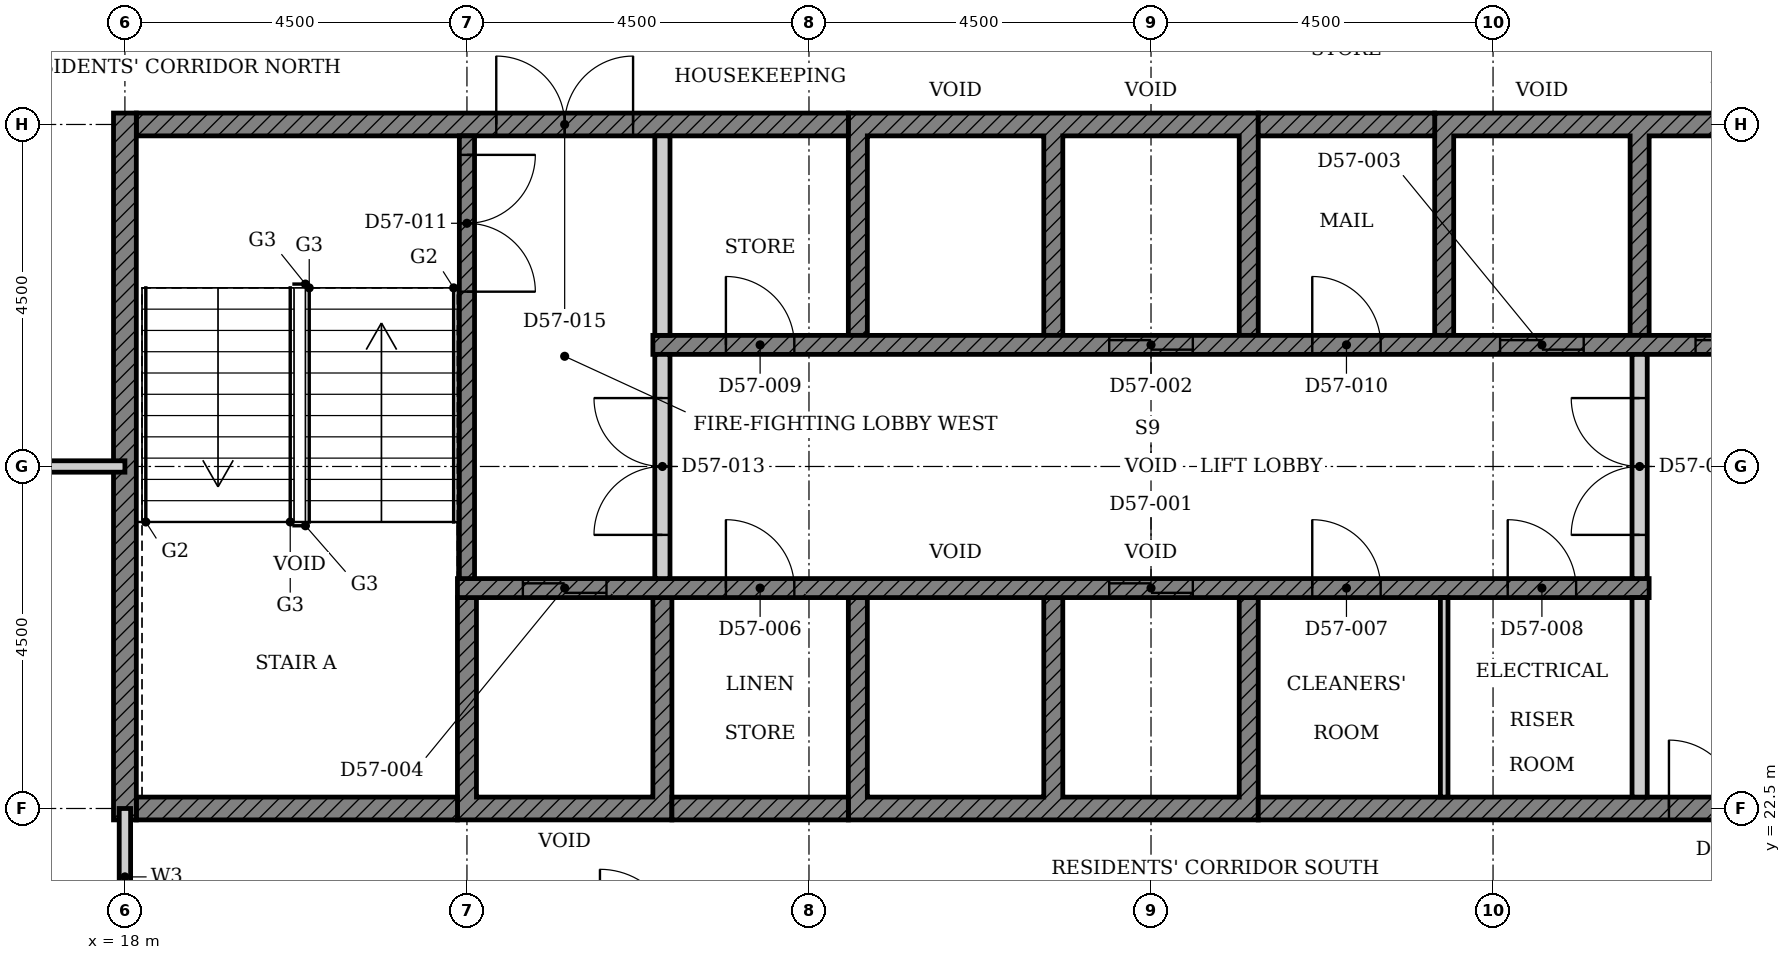
"""IFC4 building model, lengths in metres.
Left out: names, types, materials, properties, quantities, classifications, styles, units other than length and angle.
Written with IfcOpenShell. Run it as: python <this file> out.ifc"""

import sys

from ifc_helpers import new_model, si_unit, direction, frame, frame_2d, origin, place, context, subcontext, project, spatial, polyline, rectangle, outline, extrude, element, fill, save


model = new_model("IFC4")
c1 = context("Model", 3, precision=1e-05, world=origin(), true_north=direction((0.0, 1.0)))
c2 = subcontext(c1, "Body", "Model", "MODEL_VIEW")
j1 = project(units=[si_unit("LENGTHUNIT", "METRE"), si_unit("PLANEANGLEUNIT", "RADIAN")], contexts=[c1])
p1 = place(None, origin())
s1 = spatial("IfcSite", under=j1, at=p1, CompositionType="ELEMENT")
p2 = place(p1, origin())
s2 = spatial("IfcBuilding", under=s1, at=p2, CompositionType="ELEMENT")
p3 = place(p2, frame((0.0, 0.0, 225.7)))
s3 = spatial("IfcBuildingStorey", under=s2, at=p3, CompositionType="ELEMENT", Elevation=225.7)
p4 = place(p3, origin())
e1 = element("IfcWall", 1, at=p4, inside=s3, PredefinedType="SHEAR", context=c2, shape_type="SweptSolid", body=[
    extrude(outline(polyline([(22.375, 22.35), (25.197, 22.35), (25.197, 25.275), (24.947, 25.275), (24.947, 22.65), (22.625, 22.65), (22.625, 25.275), (22.375, 25.275), (22.375, 22.35)])), origin(), (0.0, 0.0, 1.0), 3.4),
])
p5 = place(p3, origin())
e2 = element("IfcWall", 2, at=p5, inside=s3, PredefinedType="SHEAR", context=c2, shape_type="SweptSolid", body=[
    extrude(outline(polyline([(27.518, 22.35), (32.911, 22.35), (32.911, 25.275), (32.661, 25.275), (32.661, 22.65), (30.339, 22.65), (30.339, 25.275), (30.089, 25.275), (30.089, 22.65), (27.768, 22.65), (27.768, 25.275), (27.518, 25.275), (27.518, 22.35)])), origin(), (0.0, 0.0, 1.0), 3.4),
])
p6 = place(p3, origin())
e3 = element("IfcWall", 3, at=p6, inside=s3, PredefinedType="SHEAR", context=c2, shape_type="SweptSolid", body=[
    extrude(outline(polyline([(27.518, 28.725), (27.768, 28.725), (27.768, 31.35), (30.089, 31.35), (30.089, 28.725), (30.339, 28.725), (30.339, 31.35), (32.661, 31.35), (32.661, 28.725), (32.911, 28.725), (32.911, 31.65), (27.518, 31.65), (27.518, 28.725)])), origin(), (0.0, 0.0, 1.0), 3.4),
])
p7 = place(p3, origin())
e4 = element("IfcWall", 4, at=p7, inside=s3, PredefinedType="SHEAR", context=c2, shape_type="SweptSolid", body=[
    extrude(outline(polyline([(35.232, 28.725), (35.482, 28.725), (35.482, 31.35), (37.803, 31.35), (37.803, 28.725), (38.053, 28.725), (38.053, 31.35), (40.375, 31.35), (40.375, 28.725), (40.625, 28.725), (40.625, 31.65), (35.232, 31.65), (35.232, 28.725)])), origin(), (0.0, 0.0, 1.0), 3.4),
])
p8 = place(p3, frame((18.15, 22.5, 0.0), z_axis=(0.0, 0.0, 1.0), x_axis=(1.0, 0.0, 0.0)))
e5 = element("IfcWall", 5, at=p8, inside=s3, PredefinedType="SHEAR", context=c2, shape_type="SweptSolid", body=[
    extrude(rectangle(XDim=4.225, YDim=0.3, at=frame_2d((2.113, 0.0))), origin(), (0.0, 0.0, 1.0), 3.4),
])
p9 = place(p3, frame((25.197, 22.5, 0.0), z_axis=(0.0, 0.0, 1.0), x_axis=(1.0, 0.0, 0.0)))
e6 = element("IfcWall", 6, at=p9, inside=s3, PredefinedType="SHEAR", context=c2, shape_type="SweptSolid", body=[
    extrude(rectangle(XDim=2.321, YDim=0.3, at=frame_2d((1.161, 0.0))), origin(), (0.0, 0.0, 1.0), 3.4),
])
p10 = place(p3, frame((32.911, 22.5, 0.0), z_axis=(0.0, 0.0, 1.0), x_axis=(1.0, 0.0, 0.0)))
e7 = element("IfcWall", 7, at=p10, inside=s3, PredefinedType="SHEAR", context=c2, shape_type="SweptSolid", body=[
    extrude(rectangle(XDim=11.939, YDim=0.3, at=frame_2d((5.97, 0.0))), origin(), (0.0, 0.0, 1.0), 3.4),
])
p11 = place(p10, frame((5.404, 0.0, 0.0)))
e8 = element("IfcOpeningElement", 8, at=p11, cuts=e7, PredefinedType="OPENING", context=c2, shape_type="SweptSolid", body=[
    extrude(rectangle(XDim=1.8, YDim=2.1, at=frame_2d((0.9, 1.05))), frame((0.0, 0.16, 0.0), z_axis=(0.0, -1.0, 0.0), x_axis=(1.0, 0.0, 0.0)), (0.0, 0.0, 1.0), 0.32),
])
p12 = place(p3, frame((18.15, 31.5, 0.0), z_axis=(0.0, 0.0, 1.0), x_axis=(1.0, 0.0, 0.0)))
e9 = element("IfcWall", 9, at=p12, inside=s3, PredefinedType="SHEAR", context=c2, shape_type="SweptSolid", body=[
    extrude(rectangle(XDim=9.368, YDim=0.3, at=frame_2d((4.684, 0.0))), origin(), (0.0, 0.0, 1.0), 3.4),
])
p13 = place(p12, frame((4.736, 0.0, 0.0)))
e10 = element("IfcOpeningElement", 10, at=p13, cuts=e9, PredefinedType="OPENING", context=c2, shape_type="SweptSolid", body=[
    extrude(rectangle(XDim=1.8, YDim=2.1, at=frame_2d((0.9, 1.05))), frame((0.0, 0.16, 0.0), z_axis=(0.0, -1.0, 0.0), x_axis=(1.0, 0.0, 0.0)), (0.0, 0.0, 1.0), 0.32),
])
p14 = place(p3, frame((32.911, 31.5, 0.0), z_axis=(0.0, 0.0, 1.0), x_axis=(1.0, 0.0, 0.0)))
e11 = element("IfcWall", 11, at=p14, inside=s3, PredefinedType="SHEAR", context=c2, shape_type="SweptSolid", body=[
    extrude(rectangle(XDim=2.322, YDim=0.3, at=frame_2d((1.161, 0.0))), origin(), (0.0, 0.0, 1.0), 3.4),
])
p15 = place(p3, frame((18.0, 22.35, 0.0), z_axis=(0.0, 0.0, 1.0), x_axis=(0.0, 1.0, 0.0)))
e12 = element("IfcWall", 12, at=p15, inside=s3, PredefinedType="SHEAR", context=c2, shape_type="SweptSolid", body=[
    extrude(rectangle(XDim=9.3, YDim=0.3, at=frame_2d((4.65, 0.0))), origin(), (0.0, 0.0, 1.0), 3.4),
])
p16 = place(p3, frame((22.375, 25.4, 0.0), z_axis=(0.0, 0.0, 1.0), x_axis=(1.0, 0.0, 0.0)))
e13 = element("IfcWall", 13, at=p16, inside=s3, PredefinedType="SHEAR", context=c2, shape_type="SweptSolid", body=[
    extrude(rectangle(XDim=15.678, YDim=0.25, at=frame_2d((7.839, 0.0))), origin(), (0.0, 0.0, 1.0), 3.4),
])
p17 = place(p16, frame((8.575, 0.0, 0.0)))
e14 = element("IfcOpeningElement", 14, at=p17, cuts=e13, PredefinedType="OPENING", context=c2, shape_type="SweptSolid", body=[
    extrude(rectangle(XDim=1.1, YDim=2.1, at=frame_2d((0.55, 1.05))), frame((0.0, 0.135, 0.0), z_axis=(0.0, -1.0, 0.0), x_axis=(1.0, 0.0, 0.0)), (0.0, 0.0, 1.0), 0.27),
])
p18 = place(p16, frame((0.861, 0.0, 0.0)))
e15 = element("IfcOpeningElement", 15, at=p18, cuts=e13, PredefinedType="OPENING", context=c2, shape_type="SweptSolid", body=[
    extrude(rectangle(XDim=1.1, YDim=2.1, at=frame_2d((0.55, 1.05))), frame((0.0, 0.135, 0.0), z_axis=(0.0, -1.0, 0.0), x_axis=(1.0, 0.0, 0.0)), (0.0, 0.0, 1.0), 0.27),
])
p19 = place(p16, frame((3.532, 0.0, 0.0)))
e16 = element("IfcOpeningElement", 16, at=p19, cuts=e13, PredefinedType="OPENING", context=c2, shape_type="SweptSolid", body=[
    extrude(rectangle(XDim=0.9, YDim=2.1, at=frame_2d((0.45, 1.05))), frame((0.0, 0.135, 0.0), z_axis=(0.0, -1.0, 0.0), x_axis=(1.0, 0.0, 0.0)), (0.0, 0.0, 1.0), 0.27),
])
p20 = place(p16, frame((11.246, 0.0, 0.0)))
e17 = element("IfcOpeningElement", 17, at=p20, cuts=e13, PredefinedType="OPENING", context=c2, shape_type="SweptSolid", body=[
    extrude(rectangle(XDim=0.9, YDim=2.1, at=frame_2d((0.45, 1.05))), frame((0.0, 0.135, 0.0), z_axis=(0.0, -1.0, 0.0), x_axis=(1.0, 0.0, 0.0)), (0.0, 0.0, 1.0), 0.27),
])
p21 = place(p16, frame((13.818, 0.0, 0.0)))
e18 = element("IfcOpeningElement", 18, at=p21, cuts=e13, PredefinedType="OPENING", context=c2, shape_type="SweptSolid", body=[
    extrude(rectangle(XDim=0.9, YDim=2.1, at=frame_2d((0.45, 1.05))), frame((0.0, 0.135, 0.0), z_axis=(0.0, -1.0, 0.0), x_axis=(1.0, 0.0, 0.0)), (0.0, 0.0, 1.0), 0.27),
])
p22 = place(p3, frame((24.947, 28.6, 0.0), z_axis=(0.0, 0.0, 1.0), x_axis=(1.0, 0.0, 0.0)))
e19 = element("IfcWall", 19, at=p22, inside=s3, PredefinedType="SHEAR", context=c2, shape_type="SweptSolid", body=[
    extrude(rectangle(XDim=15.678, YDim=0.25, at=frame_2d((7.839, 0.0))), origin(), (0.0, 0.0, 1.0), 3.4),
])
p23 = place(p22, frame((6.004, 0.0, 0.0)))
e20 = element("IfcOpeningElement", 20, at=p23, cuts=e19, PredefinedType="OPENING", context=c2, shape_type="SweptSolid", body=[
    extrude(rectangle(XDim=1.1, YDim=2.1, at=frame_2d((0.55, 1.05))), frame((0.0, 0.135, 0.0), z_axis=(0.0, -1.0, 0.0), x_axis=(1.0, 0.0, 0.0)), (0.0, 0.0, 1.0), 0.27),
])
p24 = place(p22, frame((11.146, 0.0, 0.0)))
e21 = element("IfcOpeningElement", 21, at=p24, cuts=e19, PredefinedType="OPENING", context=c2, shape_type="SweptSolid", body=[
    extrude(rectangle(XDim=1.1, YDim=2.1, at=frame_2d((0.55, 1.05))), frame((0.0, 0.135, 0.0), z_axis=(0.0, -1.0, 0.0), x_axis=(1.0, 0.0, 0.0)), (0.0, 0.0, 1.0), 0.27),
])
p25 = place(p22, frame((13.718, 0.0, 0.0)))
e22 = element("IfcOpeningElement", 22, at=p25, cuts=e19, PredefinedType="OPENING", context=c2, shape_type="SweptSolid", body=[
    extrude(rectangle(XDim=1.1, YDim=2.1, at=frame_2d((0.55, 1.05))), frame((0.0, 0.135, 0.0), z_axis=(0.0, -1.0, 0.0), x_axis=(1.0, 0.0, 0.0)), (0.0, 0.0, 1.0), 0.27),
])
p26 = place(p22, frame((0.961, 0.0, 0.0)))
e23 = element("IfcOpeningElement", 23, at=p26, cuts=e19, PredefinedType="OPENING", context=c2, shape_type="SweptSolid", body=[
    extrude(rectangle(XDim=0.9, YDim=2.1, at=frame_2d((0.45, 1.05))), frame((0.0, 0.135, 0.0), z_axis=(0.0, -1.0, 0.0), x_axis=(1.0, 0.0, 0.0)), (0.0, 0.0, 1.0), 0.27),
])
p27 = place(p22, frame((8.675, 0.0, 0.0)))
e24 = element("IfcOpeningElement", 24, at=p27, cuts=e19, PredefinedType="OPENING", context=c2, shape_type="SweptSolid", body=[
    extrude(rectangle(XDim=0.9, YDim=2.1, at=frame_2d((0.45, 1.05))), frame((0.0, 0.135, 0.0), z_axis=(0.0, -1.0, 0.0), x_axis=(1.0, 0.0, 0.0)), (0.0, 0.0, 1.0), 0.27),
])
p28 = place(p3, frame((37.928, 22.65, 0.0), z_axis=(0.0, 0.0, 1.0), x_axis=(0.0, 1.0, 0.0)))
e25 = element("IfcWall", 25, at=p28, inside=s3, PredefinedType="PARTITIONING", context=c2, shape_type="SweptSolid", body=[
    extrude(rectangle(XDim=2.625, YDim=0.2, at=frame_2d((1.312, 0.0))), origin(), (0.0, 0.0, 1.0), 3.4),
])
p29 = place(p3, frame((35.357, 22.65, 0.0), z_axis=(0.0, 0.0, 1.0), x_axis=(0.0, 1.0, 0.0)))
e26 = element("IfcWall", 26, at=p29, inside=s3, PredefinedType="PARTITIONING", context=c2, shape_type="SweptSolid", body=[
    extrude(rectangle(XDim=2.625, YDim=0.1, at=frame_2d((1.312, 0.0))), origin(), (0.0, 0.0, 1.0), 3.4),
])
p30 = place(p3, frame((25.072, 28.725, 0.0), z_axis=(0.0, 0.0, 1.0), x_axis=(0.0, 1.0, 0.0)))
e27 = element("IfcWall", 27, at=p30, inside=s3, PredefinedType="PARTITIONING", context=c2, shape_type="SweptSolid", body=[
    extrude(rectangle(XDim=2.625, YDim=0.2, at=frame_2d((1.312, 0.0))), origin(), (0.0, 0.0, 1.0), 3.4),
])
p31 = place(p3, frame((22.5, 31.35, 0.0), z_axis=(0.0, 0.0, 1.0), x_axis=(0.0, -1.0, 0.0)))
e28 = element("IfcWall", 28, at=p31, inside=s3, PredefinedType="SHEAR", context=c2, shape_type="SweptSolid", body=[
    extrude(rectangle(XDim=5.825, YDim=0.2, at=frame_2d((2.913, 0.0))), origin(), (0.0, 0.0, 1.0), 3.4),
])
p32 = place(p31, frame((0.25, 0.0, 0.0)))
e29 = element("IfcOpeningElement", 29, at=p32, cuts=e28, PredefinedType="OPENING", context=c2, shape_type="SweptSolid", body=[
    extrude(rectangle(XDim=1.8, YDim=2.1, at=frame_2d((0.9, 1.05))), frame((0.0, 0.11, 0.0), z_axis=(0.0, -1.0, 0.0), x_axis=(1.0, 0.0, 0.0)), (0.0, 0.0, 1.0), 0.22),
])
p33 = place(p3, frame((25.072, 25.525, 0.0), z_axis=(0.0, 0.0, 1.0), x_axis=(0.0, 1.0, 0.0)))
e30 = element("IfcWall", 30, at=p33, inside=s3, PredefinedType="PARTITIONING", context=c2, shape_type="SweptSolid", body=[
    extrude(rectangle(XDim=2.95, YDim=0.2, at=frame_2d((1.475, 0.0))), origin(), (0.0, 0.0, 1.0), 3.4),
])
p34 = place(p33, frame((0.575, 0.0, 0.0)))
e31 = element("IfcOpeningElement", 31, at=p34, cuts=e30, PredefinedType="OPENING", context=c2, shape_type="SweptSolid", body=[
    extrude(rectangle(XDim=1.8, YDim=2.1, at=frame_2d((0.9, 1.05))), frame((0.0, 0.11, 0.0), z_axis=(0.0, -1.0, 0.0), x_axis=(1.0, 0.0, 0.0)), (0.0, 0.0, 1.0), 0.22),
])
p35 = place(p3, frame((37.928, 25.525, 0.0), z_axis=(0.0, 0.0, 1.0), x_axis=(0.0, 1.0, 0.0)))
e32 = element("IfcWall", 32, at=p35, inside=s3, PredefinedType="PARTITIONING", context=c2, shape_type="SweptSolid", body=[
    extrude(rectangle(XDim=2.95, YDim=0.2, at=frame_2d((1.475, 0.0))), origin(), (0.0, 0.0, 1.0), 3.4),
])
p36 = place(p35, frame((0.575, 0.0, 0.0)))
e33 = element("IfcOpeningElement", 33, at=p36, cuts=e32, PredefinedType="OPENING", context=c2, shape_type="SweptSolid", body=[
    extrude(rectangle(XDim=1.8, YDim=2.1, at=frame_2d((0.9, 1.05))), frame((0.0, 0.11, 0.0), z_axis=(0.0, -1.0, 0.0), x_axis=(1.0, 0.0, 0.0)), (0.0, 0.0, 1.0), 0.22),
])
p37 = place(p3, frame((4.5, 27.0, 0.0), z_axis=(0.0, 0.0, 1.0), x_axis=(1.0, 0.0, 0.0)))
e34 = element("IfcWall", 34, at=p37, inside=s3, PredefinedType="PARTITIONING", context=c2, shape_type="SweptSolid", body=[
    extrude(rectangle(XDim=13.5, YDim=0.15, at=frame_2d((6.75, 0.0))), origin(), (0.0, 0.0, 1.0), 2.68),
])
p38 = place(p37, frame((5.35, 0.0, 0.0)))
e35 = element("IfcOpeningElement", 35, at=p38, cuts=e34, PredefinedType="OPENING", context=c2, shape_type="SweptSolid", body=[
    extrude(rectangle(XDim=1.0, YDim=2.1, at=frame_2d((0.5, 1.05))), frame((0.0, 0.085, 0.0), z_axis=(0.0, -1.0, 0.0), x_axis=(1.0, 0.0, 0.0)), (0.0, 0.0, 1.0), 0.17),
])
p39 = place(p3, frame((18.0, 20.7, 0.0), z_axis=(0.0, 0.0, 1.0), x_axis=(0.0, 1.0, 0.0)))
e36 = element("IfcWall", 36, at=p39, inside=s3, PredefinedType="PARTITIONING", context=c2, shape_type="SweptSolid", body=[
    extrude(rectangle(XDim=1.8, YDim=0.15, at=frame_2d((0.9, 0.0))), origin(), (0.0, 0.0, 1.0), 3.4),
])
p40 = place(p17, origin())
e37 = element("IfcDoor", 37, at=p40, inside=s3, OperationType="DOUBLE_DOOR_SLIDING", PredefinedType="DOOR", context=c2, shape_type="SweptSolid", body=[
    extrude(rectangle(XDim=1.1, YDim=2.1, at=frame_2d((0.55, 1.05))), frame((0.0, 0.025, 0.0), z_axis=(0.0, -1.0, 0.0), x_axis=(1.0, 0.0, 0.0)), (0.0, 0.0, 1.0), 0.05),
])
fill(e14, e37)
p41 = place(p23, origin())
e38 = element("IfcDoor", 38, at=p41, inside=s3, OperationType="DOUBLE_DOOR_SLIDING", PredefinedType="DOOR", context=c2, shape_type="SweptSolid", body=[
    extrude(rectangle(XDim=1.1, YDim=2.1, at=frame_2d((0.55, 1.05))), frame((0.0, 0.025, 0.0), z_axis=(0.0, -1.0, 0.0), x_axis=(1.0, 0.0, 0.0)), (0.0, 0.0, 1.0), 0.05),
])
fill(e20, e38)
p42 = place(p24, origin())
e39 = element("IfcDoor", 39, at=p42, inside=s3, OperationType="DOUBLE_DOOR_SLIDING", PredefinedType="DOOR", context=c2, shape_type="SweptSolid", body=[
    extrude(rectangle(XDim=1.1, YDim=2.1, at=frame_2d((0.55, 1.05))), frame((0.0, 0.025, 0.0), z_axis=(0.0, -1.0, 0.0), x_axis=(1.0, 0.0, 0.0)), (0.0, 0.0, 1.0), 0.05),
])
fill(e21, e39)
p43 = place(p18, origin())
e40 = element("IfcDoor", 40, at=p43, inside=s3, OperationType="DOUBLE_DOOR_SLIDING", PredefinedType="DOOR", context=c2, shape_type="SweptSolid", body=[
    extrude(rectangle(XDim=1.1, YDim=2.1, at=frame_2d((0.55, 1.05))), frame((0.0, 0.025, 0.0), z_axis=(0.0, -1.0, 0.0), x_axis=(1.0, 0.0, 0.0)), (0.0, 0.0, 1.0), 0.05),
])
fill(e15, e40)
p44 = place(p25, origin())
e41 = element("IfcDoor", 41, at=p44, inside=s3, OperationType="DOUBLE_DOOR_SLIDING", PredefinedType="DOOR", context=c2, shape_type="SweptSolid", body=[
    extrude(rectangle(XDim=1.1, YDim=2.1, at=frame_2d((0.55, 1.05))), frame((0.0, 0.025, 0.0), z_axis=(0.0, -1.0, 0.0), x_axis=(1.0, 0.0, 0.0)), (0.0, 0.0, 1.0), 0.05),
])
fill(e22, e41)
p45 = place(p19, origin())
e42 = element("IfcDoor", 42, at=p45, inside=s3, OperationType="SINGLE_SWING_LEFT", PredefinedType="DOOR", context=c2, shape_type="SweptSolid", body=[
    extrude(rectangle(XDim=0.9, YDim=2.1, at=frame_2d((0.45, 1.05))), frame((0.0, 0.025, 0.0), z_axis=(0.0, -1.0, 0.0), x_axis=(1.0, 0.0, 0.0)), (0.0, 0.0, 1.0), 0.05),
])
fill(e16, e42)
p46 = place(p20, origin())
e43 = element("IfcDoor", 43, at=p46, inside=s3, OperationType="SINGLE_SWING_LEFT", PredefinedType="DOOR", context=c2, shape_type="SweptSolid", body=[
    extrude(rectangle(XDim=0.9, YDim=2.1, at=frame_2d((0.45, 1.05))), frame((0.0, 0.025, 0.0), z_axis=(0.0, -1.0, 0.0), x_axis=(1.0, 0.0, 0.0)), (0.0, 0.0, 1.0), 0.05),
])
fill(e17, e43)
p47 = place(p21, origin())
e44 = element("IfcDoor", 44, at=p47, inside=s3, OperationType="SINGLE_SWING_LEFT", PredefinedType="DOOR", context=c2, shape_type="SweptSolid", body=[
    extrude(rectangle(XDim=0.9, YDim=2.1, at=frame_2d((0.45, 1.05))), frame((0.0, 0.025, 0.0), z_axis=(0.0, -1.0, 0.0), x_axis=(1.0, 0.0, 0.0)), (0.0, 0.0, 1.0), 0.05),
])
fill(e18, e44)
p48 = place(p26, origin())
e45 = element("IfcDoor", 45, at=p48, inside=s3, OperationType="SINGLE_SWING_LEFT", PredefinedType="DOOR", context=c2, shape_type="SweptSolid", body=[
    extrude(rectangle(XDim=0.9, YDim=2.1, at=frame_2d((0.45, 1.05))), frame((0.0, 0.025, 0.0), z_axis=(0.0, -1.0, 0.0), x_axis=(1.0, 0.0, 0.0)), (0.0, 0.0, 1.0), 0.05),
])
fill(e23, e45)
p49 = place(p27, origin())
e46 = element("IfcDoor", 46, at=p49, inside=s3, OperationType="SINGLE_SWING_LEFT", PredefinedType="DOOR", context=c2, shape_type="SweptSolid", body=[
    extrude(rectangle(XDim=0.9, YDim=2.1, at=frame_2d((0.45, 1.05))), frame((0.0, 0.025, 0.0), z_axis=(0.0, -1.0, 0.0), x_axis=(1.0, 0.0, 0.0)), (0.0, 0.0, 1.0), 0.05),
])
fill(e24, e46)
p50 = place(p32, origin())
e47 = element("IfcDoor", 47, at=p50, inside=s3, OperationType="DOUBLE_DOOR_SINGLE_SWING", PredefinedType="DOOR", context=c2, shape_type="SweptSolid", body=[
    extrude(rectangle(XDim=1.8, YDim=2.1, at=frame_2d((0.9, 1.05))), frame((0.0, 0.025, 0.0), z_axis=(0.0, -1.0, 0.0), x_axis=(1.0, 0.0, 0.0)), (0.0, 0.0, 1.0), 0.05),
])
fill(e29, e47)
p51 = place(p34, origin())
e48 = element("IfcDoor", 48, at=p51, inside=s3, OperationType="DOUBLE_DOOR_SINGLE_SWING", PredefinedType="DOOR", context=c2, shape_type="SweptSolid", body=[
    extrude(rectangle(XDim=1.8, YDim=2.1, at=frame_2d((0.9, 1.05))), frame((0.0, 0.025, 0.0), z_axis=(0.0, -1.0, 0.0), x_axis=(1.0, 0.0, 0.0)), (0.0, 0.0, 1.0), 0.05),
])
fill(e31, e48)
p52 = place(p36, origin())
e49 = element("IfcDoor", 49, at=p52, inside=s3, OperationType="DOUBLE_DOOR_SINGLE_SWING", PredefinedType="DOOR", context=c2, shape_type="SweptSolid", body=[
    extrude(rectangle(XDim=1.8, YDim=2.1, at=frame_2d((0.9, 1.05))), frame((0.0, 0.025, 0.0), z_axis=(0.0, -1.0, 0.0), x_axis=(1.0, 0.0, 0.0)), (0.0, 0.0, 1.0), 0.05),
])
fill(e33, e49)
p53 = place(p13, origin())
e50 = element("IfcDoor", 50, at=p53, inside=s3, OperationType="DOUBLE_DOOR_SINGLE_SWING", PredefinedType="DOOR", context=c2, shape_type="SweptSolid", body=[
    extrude(rectangle(XDim=1.8, YDim=2.1, at=frame_2d((0.9, 1.05))), frame((0.0, 0.025, 0.0), z_axis=(0.0, -1.0, 0.0), x_axis=(1.0, 0.0, 0.0)), (0.0, 0.0, 1.0), 0.05),
])
fill(e10, e50)
p54 = place(p11, origin())
e51 = element("IfcDoor", 51, at=p54, inside=s3, OperationType="DOUBLE_DOOR_SINGLE_SWING", PredefinedType="DOOR", context=c2, shape_type="SweptSolid", body=[
    extrude(rectangle(XDim=1.8, YDim=2.1, at=frame_2d((0.9, 1.05))), frame((0.0, 0.025, 0.0), z_axis=(0.0, -1.0, 0.0), x_axis=(1.0, 0.0, 0.0)), (0.0, 0.0, 1.0), 0.05),
])
fill(e8, e51)
save(model, sys.argv[1])
